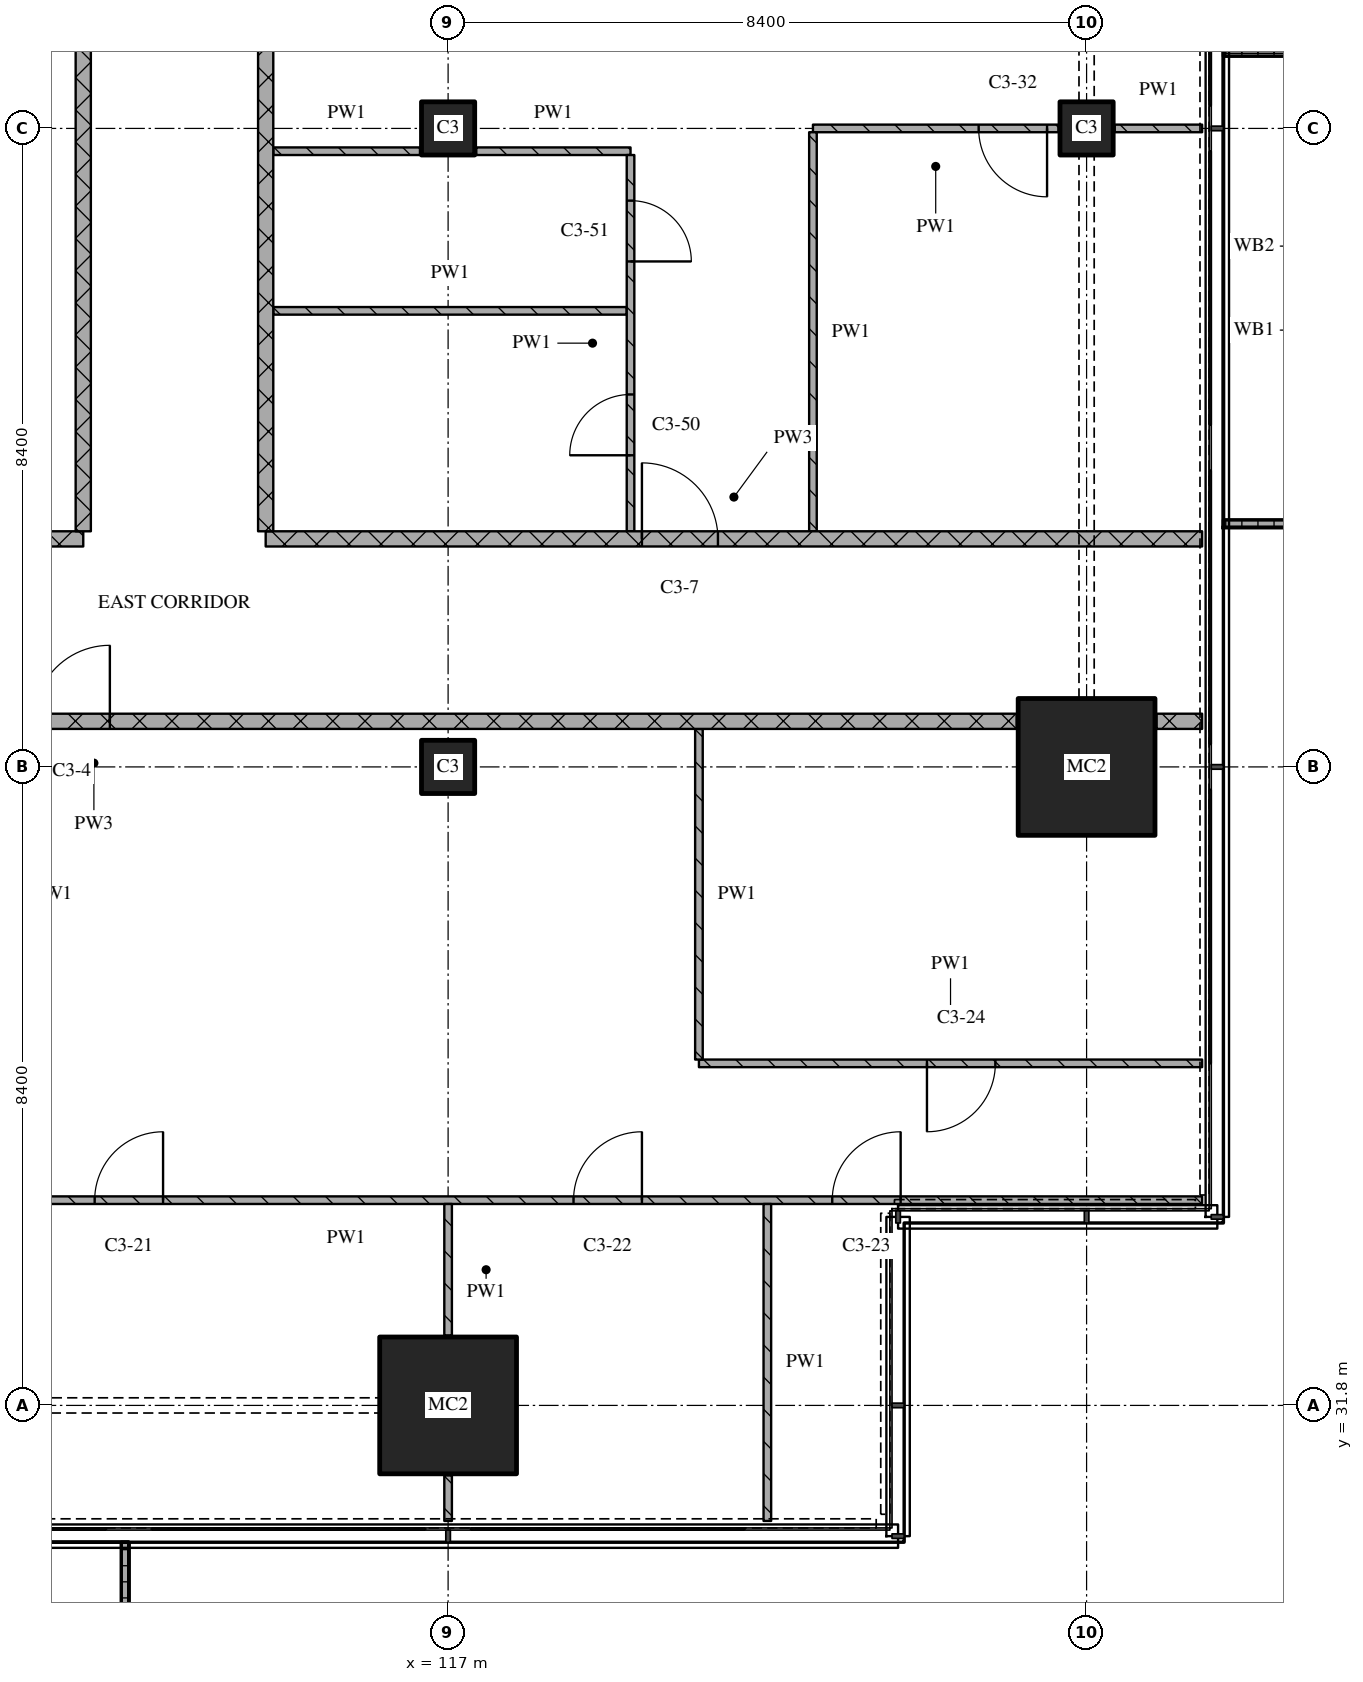
"""IFC4 building model, lengths in metres.
Left out: names, types, materials, properties, quantities, classifications, styles, units other than length and angle.
Written with IfcOpenShell. Run it as: python <this file> out.ifc"""

import sys

from ifc_helpers import new_model, si_unit, direction, frame, frame_2d, origin, origin_2d, place, context, subcontext, project, spatial, polyline, rectangle, outline, extrude, element, fill, save


model = new_model("IFC4")
c1 = context("Model", 3, precision=1e-05, world=origin(), true_north=direction((0.0, 1.0)))
c2 = subcontext(c1, "Body", "Model", "MODEL_VIEW")
j1 = project(units=[si_unit("LENGTHUNIT", "METRE"), si_unit("PLANEANGLEUNIT", "RADIAN")], contexts=[c1])
p1 = place(None, origin())
s1 = spatial("IfcSite", under=j1, at=p1, CompositionType="ELEMENT")
p2 = place(p1, origin())
s2 = spatial("IfcBuilding", under=s1, at=p2, CompositionType="ELEMENT")
p3 = place(p2, frame((0.0, 0.0, 172.65)))
s3 = spatial("IfcBuildingStorey", under=s2, at=p3, CompositionType="ELEMENT", Elevation=172.65)
p4 = place(p3, frame((117.0, 31.8, 0.0), z_axis=(0.0, 0.0, 1.0), x_axis=(1.0, 0.0, 0.0)))
e1 = element("IfcColumn", 1, at=p4, inside=s3, PredefinedType="COLUMN", context=c2, shape_type="SweptSolid", body=[
    extrude(rectangle(XDim=1.8, YDim=1.8, at=origin_2d()), origin(), (0.0, 0.0, 1.0), 3.6),
])
for number, where, z_axis, x_axis in (
    (2, (117.0, 40.2, 0.0), (0.0, 0.0, 1.0), (1.0, 0.0, 0.0)),
    (3, (117.0, 48.6, 0.0), (0.0, 0.0, 1.0), (1.0, 0.0, 0.0)),
):
    element("IfcColumn", number, at=place(p3, frame(where, z_axis=z_axis, x_axis=x_axis)), inside=s3, PredefinedType="COLUMN", context=c2, shape_type="SweptSolid", body=[
        extrude(rectangle(XDim=0.7, YDim=0.7, at=origin_2d()), origin(), (0.0, 0.0, 1.0), 3.6),
    ])
p5 = place(p3, frame((125.4, 40.2, 0.0), z_axis=(0.0, 0.0, 1.0), x_axis=(1.0, 0.0, 0.0)))
e4 = element("IfcColumn", 4, at=p5, inside=s3, PredefinedType="COLUMN", context=c2, shape_type="SweptSolid", body=[
    extrude(rectangle(XDim=1.8, YDim=1.8, at=origin_2d()), origin(), (0.0, 0.0, 1.0), 3.6),
])
p6 = place(p3, frame((125.4, 48.6, 0.0), z_axis=(0.0, 0.0, 1.0), x_axis=(1.0, 0.0, 0.0)))
e5 = element("IfcColumn", 5, at=p6, inside=s3, PredefinedType="COLUMN", context=c2, shape_type="SweptSolid", body=[
    extrude(rectangle(XDim=0.7, YDim=0.7, at=origin_2d()), origin(), (0.0, 0.0, 1.0), 3.6),
])
p7 = place(p3, origin())
e6 = element("IfcWall", 6, at=p7, inside=s3, PredefinedType="SOLIDWALL", context=c2, shape_type="SweptSolid", body=[
    extrude(outline(polyline([(108.6, 30.0), (108.7, 30.0), (108.7, 28.367), (112.7, 28.367), (112.7, 30.0), (112.8, 30.0), (112.8, 28.267), (108.6, 28.267), (108.6, 30.0)])), origin(), (0.0, 0.0, 1.0), 1.0),
])
p8 = place(p3, origin())
e7 = element("IfcWall", 7, at=p8, inside=s3, PredefinedType="SOLIDWALL", context=c2, shape_type="SweptSolid", body=[
    extrude(outline(polyline([(127.2, 43.35), (127.2, 43.45), (128.967, 43.45), (128.967, 49.55), (127.2, 49.55), (127.2, 49.65), (129.067, 49.65), (129.067, 43.35), (127.2, 43.35)])), origin(), (0.0, 0.0, 1.0), 1.0),
])
p9 = place(p3, frame((126.92, 34.5, 0.0), z_axis=(0.0, 0.0, 1.0), x_axis=(-1.0, 0.0, 0.0)))
e8 = element("IfcWall", 8, at=p9, inside=s3, PredefinedType="PARTITIONING", context=c2, shape_type="SweptSolid", body=[
    extrude(rectangle(XDim=22.52, YDim=0.1, at=frame_2d((11.26, 0.0))), origin(), (0.0, 0.0, 1.0), 3.32),
])
p10 = place(p9, frame((3.966, 0.0, 0.0)))
e9 = element("IfcOpeningElement", 9, at=p10, cuts=e8, PredefinedType="OPENING", context=c2, shape_type="SweptSolid", body=[
    extrude(rectangle(XDim=0.9, YDim=2.1, at=frame_2d((0.45, 1.05))), frame((0.0, 0.06, 0.0), z_axis=(0.0, -1.0, 0.0), x_axis=(1.0, 0.0, 0.0)), (0.0, 0.0, 1.0), 0.12),
])
p11 = place(p9, frame((7.37, 0.0, 0.0)))
e10 = element("IfcOpeningElement", 10, at=p11, cuts=e8, PredefinedType="OPENING", context=c2, shape_type="SweptSolid", body=[
    extrude(rectangle(XDim=0.9, YDim=2.1, at=frame_2d((0.45, 1.05))), frame((0.0, 0.06, 0.0), z_axis=(0.0, -1.0, 0.0), x_axis=(1.0, 0.0, 0.0)), (0.0, 0.0, 1.0), 0.12),
])
p12 = place(p9, frame((13.67, 0.0, 0.0)))
e11 = element("IfcOpeningElement", 11, at=p12, cuts=e8, PredefinedType="OPENING", context=c2, shape_type="SweptSolid", body=[
    extrude(rectangle(XDim=0.9, YDim=2.1, at=frame_2d((0.45, 1.05))), frame((0.0, 0.06, 0.0), z_axis=(0.0, -1.0, 0.0), x_axis=(1.0, 0.0, 0.0)), (0.0, 0.0, 1.0), 0.12),
])
p13 = place(p9, frame((19.97, 0.0, 0.0)))
e12 = element("IfcOpeningElement", 12, at=p13, cuts=e8, PredefinedType="OPENING", context=c2, shape_type="SweptSolid", body=[
    extrude(rectangle(XDim=0.9, YDim=2.1, at=frame_2d((0.45, 1.05))), frame((0.0, 0.06, 0.0), z_axis=(0.0, -1.0, 0.0), x_axis=(1.0, 0.0, 0.0)), (0.0, 0.0, 1.0), 0.12),
])
p14 = place(p3, frame((120.3, 36.3, 0.0), z_axis=(0.0, 0.0, 1.0), x_axis=(1.0, 0.0, 0.0)))
e13 = element("IfcWall", 13, at=p14, inside=s3, PredefinedType="PARTITIONING", context=c2, shape_type="SweptSolid", body=[
    extrude(rectangle(XDim=6.62, YDim=0.1, at=frame_2d((3.31, 0.0))), origin(), (0.0, 0.0, 1.0), 3.32),
])
p15 = place(p14, frame((3.0, 0.0, 0.0)))
e14 = element("IfcOpeningElement", 14, at=p15, cuts=e13, PredefinedType="OPENING", context=c2, shape_type="SweptSolid", body=[
    extrude(rectangle(XDim=0.9, YDim=2.1, at=frame_2d((0.45, 1.05))), frame((0.0, 0.06, 0.0), z_axis=(0.0, -1.0, 0.0), x_axis=(1.0, 0.0, 0.0)), (0.0, 0.0, 1.0), 0.12),
])
p16 = place(p3, frame((124.48, 40.8, 0.0), z_axis=(0.0, 0.0, 1.0), x_axis=(-1.0, 0.0, 0.0)))
e15 = element("IfcWall", 15, at=p16, inside=s3, PredefinedType="PARTITIONING", context=c2, shape_type="SweptSolid", body=[
    extrude(rectangle(XDim=24.28, YDim=0.2, at=frame_2d((12.14, 0.0))), origin(), (0.0, 0.0, 1.0), 3.32),
])
p17 = place(p16, frame((11.93, 0.0, 0.0)))
e16 = element("IfcOpeningElement", 16, at=p17, cuts=e15, PredefinedType="OPENING", context=c2, shape_type="SweptSolid", body=[
    extrude(rectangle(XDim=1.0, YDim=2.1, at=frame_2d((0.5, 1.05))), frame((0.0, 0.11, 0.0), z_axis=(0.0, -1.0, 0.0), x_axis=(1.0, 0.0, 0.0)), (0.0, 0.0, 1.0), 0.22),
])
p18 = place(p3, frame((126.32, 40.8, 0.0), z_axis=(0.0, 0.0, 1.0), x_axis=(1.0, 0.0, 0.0)))
e17 = element("IfcWall", 17, at=p18, inside=s3, PredefinedType="PARTITIONING", context=c2, shape_type="SweptSolid", body=[
    extrude(rectangle(XDim=0.6, YDim=0.2, at=frame_2d((0.3, 0.0))), origin(), (0.0, 0.0, 1.0), 3.32),
])
p19 = place(p3, frame((107.0, 43.2, 0.0), z_axis=(0.0, 0.0, 1.0), x_axis=(1.0, 0.0, 0.0)))
e18 = element("IfcWall", 18, at=p19, inside=s3, PredefinedType="PARTITIONING", context=c2, shape_type="SweptSolid", body=[
    extrude(rectangle(XDim=5.2, YDim=0.2, at=frame_2d((2.6, 0.0))), origin(), (0.0, 0.0, 1.0), 3.32),
])
p20 = place(p19, frame((2.15, 0.0, 0.0)))
e19 = element("IfcOpeningElement", 19, at=p20, cuts=e18, PredefinedType="OPENING", context=c2, shape_type="SweptSolid", body=[
    extrude(rectangle(XDim=0.9, YDim=2.1, at=frame_2d((0.45, 1.05))), frame((0.0, 0.11, 0.0), z_axis=(0.0, -1.0, 0.0), x_axis=(1.0, 0.0, 0.0)), (0.0, 0.0, 1.0), 0.22),
])
p21 = place(p3, frame((114.6, 43.2, 0.0), z_axis=(0.0, 0.0, 1.0), x_axis=(1.0, 0.0, 0.0)))
e20 = element("IfcWall", 20, at=p21, inside=s3, PredefinedType="PARTITIONING", context=c2, shape_type="SweptSolid", body=[
    extrude(rectangle(XDim=12.32, YDim=0.2, at=frame_2d((6.16, 0.0))), origin(), (0.0, 0.0, 1.0), 3.32),
])
p22 = place(p21, frame((4.95, 0.0, 0.0)))
e21 = element("IfcOpeningElement", 21, at=p22, cuts=e20, PredefinedType="OPENING", context=c2, shape_type="SweptSolid", body=[
    extrude(rectangle(XDim=1.0, YDim=2.1, at=frame_2d((0.5, 1.05))), frame((0.0, 0.11, 0.0), z_axis=(0.0, -1.0, 0.0), x_axis=(1.0, 0.0, 0.0)), (0.0, 0.0, 1.0), 0.22),
])
p23 = place(p3, frame((114.7, 46.2, 0.0), z_axis=(0.0, 0.0, 1.0), x_axis=(1.0, 0.0, 0.0)))
e22 = element("IfcWall", 22, at=p23, inside=s3, PredefinedType="PARTITIONING", context=c2, shape_type="SweptSolid", body=[
    extrude(rectangle(XDim=4.65, YDim=0.1, at=frame_2d((2.325, 0.0))), origin(), (0.0, 0.0, 1.0), 3.32),
])
p24 = place(p3, frame((114.7, 48.3, 0.0), z_axis=(0.0, 0.0, 1.0), x_axis=(1.0, 0.0, 0.0)))
e23 = element("IfcWall", 23, at=p24, inside=s3, PredefinedType="PARTITIONING", context=c2, shape_type="SweptSolid", body=[
    extrude(rectangle(XDim=1.93, YDim=0.1, at=frame_2d((0.965, 0.0))), origin(), (0.0, 0.0, 1.0), 3.32),
])
p25 = place(p3, frame((117.37, 48.3, 0.0), z_axis=(0.0, 0.0, 1.0), x_axis=(1.0, 0.0, 0.0)))
e24 = element("IfcWall", 24, at=p25, inside=s3, PredefinedType="PARTITIONING", context=c2, shape_type="SweptSolid", body=[
    extrude(rectangle(XDim=2.03, YDim=0.1, at=frame_2d((1.015, 0.0))), origin(), (0.0, 0.0, 1.0), 3.32),
])
p26 = place(p3, frame((125.03, 48.6, 0.0), z_axis=(0.0, 0.0, 1.0), x_axis=(-1.0, 0.0, 0.0)))
e25 = element("IfcWall", 25, at=p26, inside=s3, PredefinedType="PARTITIONING", context=c2, shape_type="SweptSolid", body=[
    extrude(rectangle(XDim=3.23, YDim=0.1, at=frame_2d((1.615, 0.0))), origin(), (0.0, 0.0, 1.0), 3.32),
])
p27 = place(p26, frame((0.15, 0.0, 0.0)))
e26 = element("IfcOpeningElement", 26, at=p27, cuts=e25, PredefinedType="OPENING", context=c2, shape_type="SweptSolid", body=[
    extrude(rectangle(XDim=0.9, YDim=2.1, at=frame_2d((0.45, 1.05))), frame((0.0, 0.06, 0.0), z_axis=(0.0, -1.0, 0.0), x_axis=(1.0, 0.0, 0.0)), (0.0, 0.0, 1.0), 0.12),
])
p28 = place(p3, frame((125.77, 48.6, 0.0), z_axis=(0.0, 0.0, 1.0), x_axis=(1.0, 0.0, 0.0)))
e27 = element("IfcWall", 27, at=p28, inside=s3, PredefinedType="PARTITIONING", context=c2, shape_type="SweptSolid", body=[
    extrude(rectangle(XDim=1.15, YDim=0.1, at=frame_2d((0.575, 0.0))), origin(), (0.0, 0.0, 1.0), 3.32),
])
p29 = place(p3, frame((112.2, 58.7, 0.0), z_axis=(0.0, 0.0, 1.0), x_axis=(0.0, -1.0, 0.0)))
e28 = element("IfcWall", 28, at=p29, inside=s3, PredefinedType="PARTITIONING", context=c2, shape_type="SweptSolid", body=[
    extrude(rectangle(XDim=15.4, YDim=0.2, at=frame_2d((7.7, 0.0))), origin(), (0.0, 0.0, 1.0), 3.32),
])
p30 = place(p3, frame((114.6, 61.1, 0.0), z_axis=(0.0, 0.0, 1.0), x_axis=(0.0, -1.0, 0.0)))
e29 = element("IfcWall", 29, at=p30, inside=s3, PredefinedType="PARTITIONING", context=c2, shape_type="SweptSolid", body=[
    extrude(rectangle(XDim=17.8, YDim=0.2, at=frame_2d((8.9, 0.0))), origin(), (0.0, 0.0, 1.0), 3.32),
])
p31 = place(p3, frame((117.0, 30.88, 0.0), z_axis=(0.0, 0.0, 1.0), x_axis=(0.0, -1.0, 0.0)))
e30 = element("IfcWall", 30, at=p31, inside=s3, PredefinedType="PARTITIONING", context=c2, shape_type="SweptSolid", body=[
    extrude(rectangle(XDim=0.6, YDim=0.1, at=frame_2d((0.3, 0.0))), origin(), (0.0, 0.0, 1.0), 3.32),
])
p32 = place(p3, frame((117.0, 34.45, 0.0), z_axis=(0.0, 0.0, 1.0), x_axis=(0.0, -1.0, 0.0)))
e31 = element("IfcWall", 31, at=p32, inside=s3, PredefinedType="PARTITIONING", context=c2, shape_type="SweptSolid", body=[
    extrude(rectangle(XDim=1.73, YDim=0.1, at=frame_2d((0.865, 0.0))), origin(), (0.0, 0.0, 1.0), 3.32),
])
p33 = place(p3, frame((119.4, 43.3, 0.0), z_axis=(0.0, 0.0, 1.0), x_axis=(0.0, 1.0, 0.0)))
e32 = element("IfcWall", 32, at=p33, inside=s3, PredefinedType="PARTITIONING", context=c2, shape_type="SweptSolid", body=[
    extrude(rectangle(XDim=4.95, YDim=0.1, at=frame_2d((2.475, 0.0))), origin(), (0.0, 0.0, 1.0), 3.32),
])
p34 = place(p33, frame((1.0, 0.0, 0.0)))
e33 = element("IfcOpeningElement", 33, at=p34, cuts=e32, PredefinedType="OPENING", context=c2, shape_type="SweptSolid", body=[
    extrude(rectangle(XDim=0.8, YDim=2.1, at=frame_2d((0.4, 1.05))), frame((0.0, 0.06, 0.0), z_axis=(0.0, -1.0, 0.0), x_axis=(1.0, 0.0, 0.0)), (0.0, 0.0, 1.0), 0.12),
])
p35 = place(p33, frame((3.55, 0.0, 0.0)))
e34 = element("IfcOpeningElement", 34, at=p35, cuts=e32, PredefinedType="OPENING", context=c2, shape_type="SweptSolid", body=[
    extrude(rectangle(XDim=0.8, YDim=2.1, at=frame_2d((0.4, 1.05))), frame((0.0, 0.06, 0.0), z_axis=(0.0, -1.0, 0.0), x_axis=(1.0, 0.0, 0.0)), (0.0, 0.0, 1.0), 0.12),
])
p36 = place(p3, frame((120.3, 40.7, 0.0), z_axis=(0.0, 0.0, 1.0), x_axis=(0.0, -1.0, 0.0)))
e35 = element("IfcWall", 35, at=p36, inside=s3, PredefinedType="PARTITIONING", context=c2, shape_type="SweptSolid", body=[
    extrude(rectangle(XDim=4.35, YDim=0.1, at=frame_2d((2.175, 0.0))), origin(), (0.0, 0.0, 1.0), 3.32),
])
p37 = place(p3, frame((121.2, 34.45, 0.0), z_axis=(0.0, 0.0, 1.0), x_axis=(0.0, -1.0, 0.0)))
e36 = element("IfcWall", 36, at=p37, inside=s3, PredefinedType="PARTITIONING", context=c2, shape_type="SweptSolid", body=[
    extrude(rectangle(XDim=4.17, YDim=0.1, at=frame_2d((2.085, 0.0))), origin(), (0.0, 0.0, 1.0), 3.32),
])
p38 = place(p3, frame((121.8, 48.55, 0.0), z_axis=(0.0, 0.0, 1.0), x_axis=(0.0, -1.0, 0.0)))
e37 = element("IfcWall", 37, at=p38, inside=s3, PredefinedType="PARTITIONING", context=c2, shape_type="SweptSolid", body=[
    extrude(rectangle(XDim=5.25, YDim=0.1, at=frame_2d((2.625, 0.0))), origin(), (0.0, 0.0, 1.0), 3.32),
])
p39 = place(p10, origin())
e38 = element("IfcDoor", 38, at=p39, inside=s3, OperationType="SINGLE_SWING_RIGHT", PredefinedType="DOOR", context=c2, shape_type="SweptSolid", body=[
    extrude(rectangle(XDim=0.9, YDim=2.1, at=frame_2d((0.45, 1.05))), frame((0.0, 0.025, 0.0), z_axis=(0.0, -1.0, 0.0), x_axis=(1.0, 0.0, 0.0)), (0.0, 0.0, 1.0), 0.05),
])
fill(e9, e38)
p40 = place(p11, origin())
e39 = element("IfcDoor", 39, at=p40, inside=s3, OperationType="SINGLE_SWING_RIGHT", PredefinedType="DOOR", context=c2, shape_type="SweptSolid", body=[
    extrude(rectangle(XDim=0.9, YDim=2.1, at=frame_2d((0.45, 1.05))), frame((0.0, 0.025, 0.0), z_axis=(0.0, -1.0, 0.0), x_axis=(1.0, 0.0, 0.0)), (0.0, 0.0, 1.0), 0.05),
])
fill(e10, e39)
p41 = place(p12, origin())
e40 = element("IfcDoor", 40, at=p41, inside=s3, OperationType="SINGLE_SWING_RIGHT", PredefinedType="DOOR", context=c2, shape_type="SweptSolid", body=[
    extrude(rectangle(XDim=0.9, YDim=2.1, at=frame_2d((0.45, 1.05))), frame((0.0, 0.025, 0.0), z_axis=(0.0, -1.0, 0.0), x_axis=(1.0, 0.0, 0.0)), (0.0, 0.0, 1.0), 0.05),
])
fill(e11, e40)
p42 = place(p15, origin())
e41 = element("IfcDoor", 41, at=p42, inside=s3, OperationType="SINGLE_SWING_RIGHT", PredefinedType="DOOR", context=c2, shape_type="SweptSolid", body=[
    extrude(rectangle(XDim=0.9, YDim=2.1, at=frame_2d((0.45, 1.05))), frame((0.0, 0.025, 0.0), z_axis=(0.0, -1.0, 0.0), x_axis=(1.0, 0.0, 0.0)), (0.0, 0.0, 1.0), 0.05),
])
fill(e14, e41)
p43 = place(p17, origin())
e42 = element("IfcDoor", 42, at=p43, inside=s3, OperationType="SINGLE_SWING_RIGHT", PredefinedType="DOOR", context=c2, shape_type="SweptSolid", body=[
    extrude(rectangle(XDim=1.0, YDim=2.1, at=frame_2d((0.5, 1.05))), frame((0.0, 0.025, 0.0), z_axis=(0.0, -1.0, 0.0), x_axis=(1.0, 0.0, 0.0)), (0.0, 0.0, 1.0), 0.05),
])
fill(e16, e42)
p44 = place(p22, origin())
e43 = element("IfcDoor", 43, at=p44, inside=s3, OperationType="SINGLE_SWING_LEFT", PredefinedType="DOOR", context=c2, shape_type="SweptSolid", body=[
    extrude(rectangle(XDim=1.0, YDim=2.1, at=frame_2d((0.5, 1.05))), frame((0.0, 0.025, 0.0), z_axis=(0.0, -1.0, 0.0), x_axis=(1.0, 0.0, 0.0)), (0.0, 0.0, 1.0), 0.05),
])
fill(e21, e43)
p45 = place(p27, origin())
e44 = element("IfcDoor", 44, at=p45, inside=s3, OperationType="SINGLE_SWING_LEFT", PredefinedType="DOOR", context=c2, shape_type="SweptSolid", body=[
    extrude(rectangle(XDim=0.9, YDim=2.1, at=frame_2d((0.45, 1.05))), frame((0.0, 0.025, 0.0), z_axis=(0.0, -1.0, 0.0), x_axis=(1.0, 0.0, 0.0)), (0.0, 0.0, 1.0), 0.05),
])
fill(e26, e44)
p46 = place(p34, origin())
e45 = element("IfcDoor", 45, at=p46, inside=s3, OperationType="SINGLE_SWING_LEFT", PredefinedType="DOOR", context=c2, shape_type="SweptSolid", body=[
    extrude(rectangle(XDim=0.8, YDim=2.1, at=frame_2d((0.4, 1.05))), frame((0.0, 0.025, 0.0), z_axis=(0.0, -1.0, 0.0), x_axis=(1.0, 0.0, 0.0)), (0.0, 0.0, 1.0), 0.05),
])
fill(e33, e45)
p47 = place(p35, origin())
e46 = element("IfcDoor", 46, at=p47, inside=s3, OperationType="SINGLE_SWING_RIGHT", PredefinedType="DOOR", context=c2, shape_type="SweptSolid", body=[
    extrude(rectangle(XDim=0.8, YDim=2.1, at=frame_2d((0.4, 1.05))), frame((0.0, 0.025, 0.0), z_axis=(0.0, -1.0, 0.0), x_axis=(1.0, 0.0, 0.0)), (0.0, 0.0, 1.0), 0.05),
])
fill(e34, e46)
save(model, sys.argv[1])
